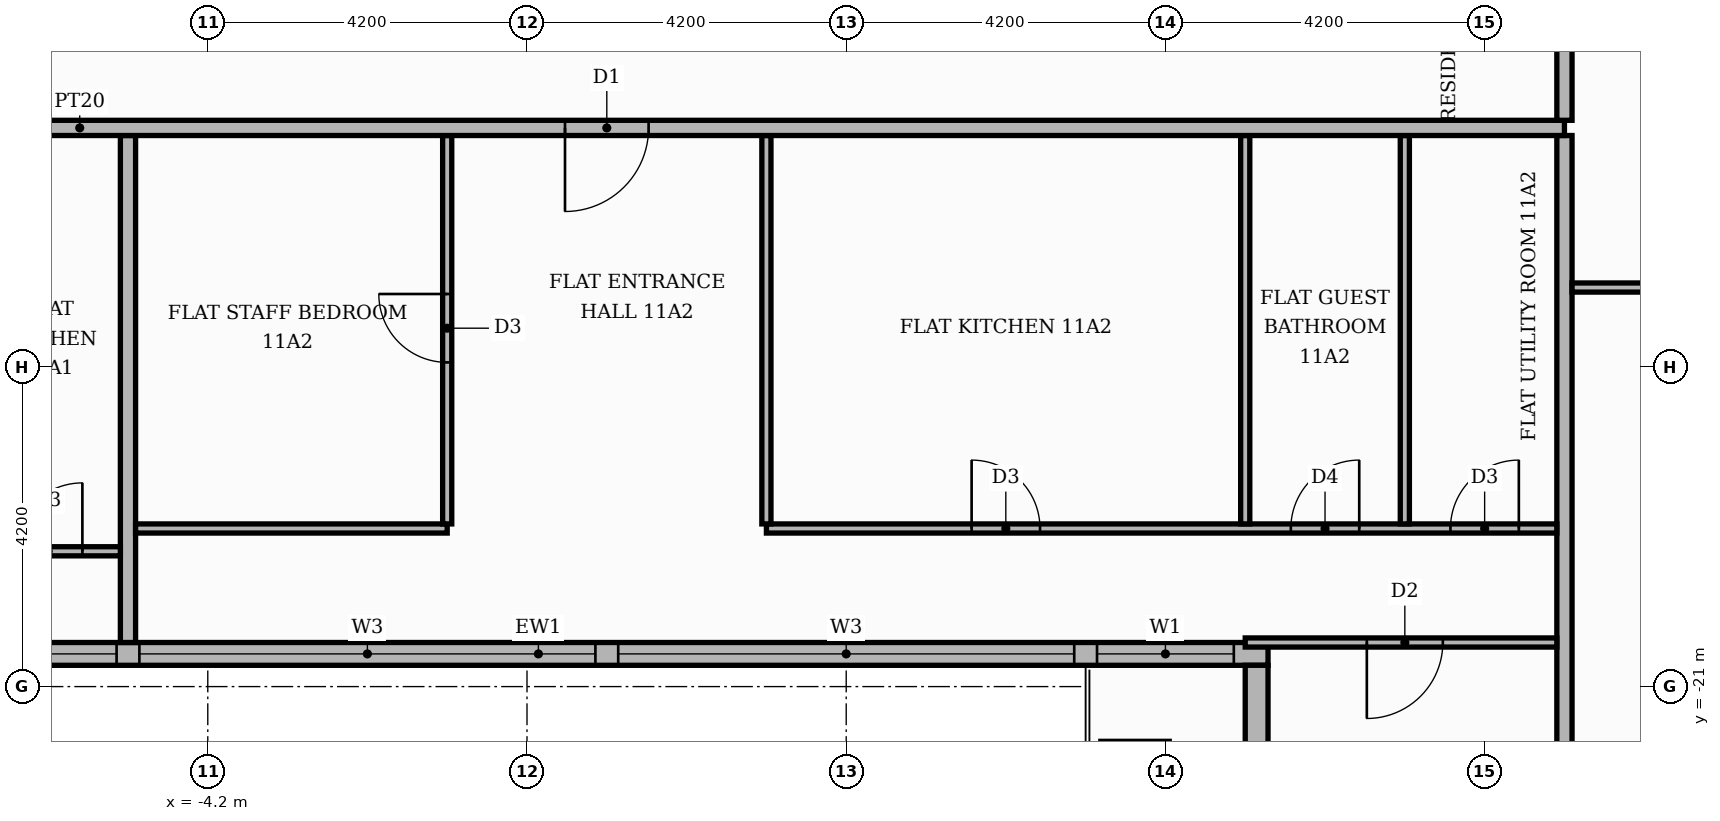
"""IFC4 building model, lengths in metres.
Left out: names, types, materials, properties, quantities, classifications, styles, units other than length and angle.
Written with IfcOpenShell. Run it as: python <this file> out.ifc"""

import sys

from ifc_helpers import new_model, si_unit, direction, frame, frame_2d, origin, place, context, subcontext, project, spatial, rectangle, extrude, element, fill, save


model = new_model("IFC4")
c1 = context("Model", 3, precision=1e-05, world=origin(), true_north=direction((0.0, 1.0)))
c2 = subcontext(c1, "Body", "Model", "MODEL_VIEW")
j1 = project(units=[si_unit("LENGTHUNIT", "METRE"), si_unit("PLANEANGLEUNIT", "RADIAN")], contexts=[c1])
p1 = place(None, origin())
s1 = spatial("IfcSite", under=j1, at=p1, CompositionType="ELEMENT")
p2 = place(p1, origin())
s2 = spatial("IfcBuilding", under=s1, at=p2, CompositionType="ELEMENT")
p3 = place(p2, frame((0.0, 0.0, 50.4)))
s3 = spatial("IfcBuildingStorey", under=s2, at=p3, CompositionType="ELEMENT", Elevation=50.4)
p4 = place(p3, frame((-9.45, -20.57, 0.0), z_axis=(0.0, 0.0, 1.0), x_axis=(1.0, 0.0, 0.0)))
e1 = element("IfcWall", 1, at=p4, inside=s3, PredefinedType="STANDARD", context=c2, shape_type="SweptSolid", body=[
    extrude(rectangle(XDim=19.2, YDim=0.3, at=frame_2d((9.6, 0.0))), origin(), (0.0, 0.0, 1.0), 3.48),
])
p5 = place(p4, frame((0.15, 0.0, 0.9)))
e2 = element("IfcOpeningElement", 2, at=p5, cuts=e1, PredefinedType="OPENING", context=c2, shape_type="SweptSolid", body=[
    extrude(rectangle(XDim=3.9, YDim=2.1, at=frame_2d((1.95, 1.05))), frame((0.0, 0.16, 0.0), z_axis=(0.0, -1.0, 0.0), x_axis=(1.0, 0.0, 0.0)), (0.0, 0.0, 1.0), 0.32),
])
p6 = place(p4, frame((4.35, 0.0, 0.9)))
e3 = element("IfcOpeningElement", 3, at=p6, cuts=e1, PredefinedType="OPENING", context=c2, shape_type="SweptSolid", body=[
    extrude(rectangle(XDim=6.0, YDim=2.1, at=frame_2d((3.0, 1.05))), frame((0.0, 0.16, 0.0), z_axis=(0.0, -1.0, 0.0), x_axis=(1.0, 0.0, 0.0)), (0.0, 0.0, 1.0), 0.32),
])
p7 = place(p4, frame((10.65, 0.0, 0.9)))
e4 = element("IfcOpeningElement", 4, at=p7, cuts=e1, PredefinedType="OPENING", context=c2, shape_type="SweptSolid", body=[
    extrude(rectangle(XDim=6.0, YDim=2.1, at=frame_2d((3.0, 1.05))), frame((0.0, 0.16, 0.0), z_axis=(0.0, -1.0, 0.0), x_axis=(1.0, 0.0, 0.0)), (0.0, 0.0, 1.0), 0.32),
])
p8 = place(p4, frame((16.95, 0.0, 0.9)))
e5 = element("IfcOpeningElement", 5, at=p8, cuts=e1, PredefinedType="OPENING", context=c2, shape_type="SweptSolid", body=[
    extrude(rectangle(XDim=1.8, YDim=2.1, at=frame_2d((0.9, 1.05))), frame((0.0, 0.16, 0.0), z_axis=(0.0, -1.0, 0.0), x_axis=(1.0, 0.0, 0.0)), (0.0, 0.0, 1.0), 0.32),
])
p9 = place(p3, frame((9.6, -20.72, 0.0), z_axis=(0.0, 0.0, 1.0), x_axis=(0.0, -1.0, 0.0)))
e6 = element("IfcWall", 6, at=p9, inside=s3, PredefinedType="STANDARD", context=c2, shape_type="SweptSolid", body=[
    extrude(rectangle(XDim=5.0, YDim=0.3, at=frame_2d((2.5, 0.0))), origin(), (0.0, 0.0, 1.0), 3.48),
])
p10 = place(p9, frame((1.48, 0.0, 0.0)))
e7 = element("IfcOpeningElement", 7, at=p10, cuts=e6, PredefinedType="OPENING", context=c2, shape_type="SweptSolid", body=[
    extrude(rectangle(XDim=1.8, YDim=2.4, at=frame_2d((0.9, 1.2))), frame((0.0, 0.16, 0.0), z_axis=(0.0, -1.0, 0.0), x_axis=(1.0, 0.0, 0.0)), (0.0, 0.0, 1.0), 0.32),
])
p11 = place(p3, frame((13.65, -25.42, 0.0), z_axis=(0.0, 0.0, 1.0), x_axis=(0.0, 1.0, 0.0)))
e8 = element("IfcWall", 8, at=p11, inside=s3, PredefinedType="PARTITIONING", context=c2, shape_type="SweptSolid", body=[
    extrude(rectangle(XDim=11.67, YDim=0.2, at=frame_2d((5.835, 0.0))), origin(), (0.0, 0.0, 1.0), 3.48),
])
p12 = place(p3, frame((-5.25, -20.42, 0.0), z_axis=(0.0, 0.0, 1.0), x_axis=(0.0, 1.0, 0.0)))
e9 = element("IfcWall", 9, at=p12, inside=s3, PredefinedType="PARTITIONING", context=c2, shape_type="SweptSolid", body=[
    extrude(rectangle(XDim=6.67, YDim=0.2, at=frame_2d((3.335, 0.0))), origin(), (0.0, 0.0, 1.0), 3.48),
])
p13 = place(p3, frame((9.45, -20.42, 0.0), z_axis=(0.0, 0.0, 1.0), x_axis=(1.0, 0.0, 0.0)))
e10 = element("IfcWall", 10, at=p13, inside=s3, PredefinedType="PARTITIONING", context=c2, shape_type="SweptSolid", body=[
    extrude(rectangle(XDim=4.1, YDim=0.12, at=frame_2d((2.05, 0.0))), origin(), (0.0, 0.0, 1.0), 3.48),
])
p14 = place(p13, frame((1.6, 0.0, 0.0)))
e11 = element("IfcOpeningElement", 11, at=p14, cuts=e10, PredefinedType="OPENING", context=c2, shape_type="SweptSolid", body=[
    extrude(rectangle(XDim=1.0, YDim=2.1, at=frame_2d((0.5, 1.05))), frame((0.0, 0.07, 0.0), z_axis=(0.0, -1.0, 0.0), x_axis=(1.0, 0.0, 0.0)), (0.0, 0.0, 1.0), 0.14),
])
p15 = place(p3, frame((-9.45, -19.22, 0.0), z_axis=(0.0, 0.0, 1.0), x_axis=(1.0, 0.0, 0.0)))
e12 = element("IfcWall", 12, at=p15, inside=s3, PredefinedType="PARTITIONING", context=c2, shape_type="SweptSolid", body=[
    extrude(rectangle(XDim=4.1, YDim=0.12, at=frame_2d((2.05, 0.0))), origin(), (0.0, 0.0, 1.0), 3.48),
])
p16 = place(p15, frame((2.7, 0.0, 0.0)))
e13 = element("IfcOpeningElement", 13, at=p16, cuts=e12, PredefinedType="OPENING", context=c2, shape_type="SweptSolid", body=[
    extrude(rectangle(XDim=0.9, YDim=2.1, at=frame_2d((0.45, 1.05))), frame((0.0, 0.07, 0.0), z_axis=(0.0, -1.0, 0.0), x_axis=(1.0, 0.0, 0.0)), (0.0, 0.0, 1.0), 0.14),
])
p17 = place(p3, frame((-5.15, -18.92, 0.0), z_axis=(0.0, 0.0, 1.0), x_axis=(1.0, 0.0, 0.0)))
e14 = element("IfcWall", 14, at=p17, inside=s3, PredefinedType="PARTITIONING", context=c2, shape_type="SweptSolid", body=[
    extrude(rectangle(XDim=4.1, YDim=0.12, at=frame_2d((2.05, 0.0))), origin(), (0.0, 0.0, 1.0), 3.48),
])
p18 = place(p3, frame((3.15, -18.92, 0.0), z_axis=(0.0, 0.0, 1.0), x_axis=(1.0, 0.0, 0.0)))
e15 = element("IfcWall", 15, at=p18, inside=s3, PredefinedType="PARTITIONING", context=c2, shape_type="SweptSolid", body=[
    extrude(rectangle(XDim=10.4, YDim=0.12, at=frame_2d((5.2, 0.0))), origin(), (0.0, 0.0, 1.0), 3.48),
])
p19 = place(p18, frame((2.7, 0.0, 0.0)))
e16 = element("IfcOpeningElement", 16, at=p19, cuts=e15, PredefinedType="OPENING", context=c2, shape_type="SweptSolid", body=[
    extrude(rectangle(XDim=0.9, YDim=2.1, at=frame_2d((0.45, 1.05))), frame((0.0, 0.07, 0.0), z_axis=(0.0, -1.0, 0.0), x_axis=(1.0, 0.0, 0.0)), (0.0, 0.0, 1.0), 0.14),
])
p20 = place(p18, frame((6.9, 0.0, 0.0)))
e17 = element("IfcOpeningElement", 17, at=p20, cuts=e15, PredefinedType="OPENING", context=c2, shape_type="SweptSolid", body=[
    extrude(rectangle(XDim=0.9, YDim=2.1, at=frame_2d((0.45, 1.05))), frame((0.0, 0.07, 0.0), z_axis=(0.0, -1.0, 0.0), x_axis=(1.0, 0.0, 0.0)), (0.0, 0.0, 1.0), 0.14),
])
p21 = place(p18, frame((9.0, 0.0, 0.0)))
e18 = element("IfcOpeningElement", 18, at=p21, cuts=e15, PredefinedType="OPENING", context=c2, shape_type="SweptSolid", body=[
    extrude(rectangle(XDim=0.9, YDim=2.1, at=frame_2d((0.45, 1.05))), frame((0.0, 0.07, 0.0), z_axis=(0.0, -1.0, 0.0), x_axis=(1.0, 0.0, 0.0)), (0.0, 0.0, 1.0), 0.14),
])
p22 = place(p3, frame((-1.05, -18.86, 0.0), z_axis=(0.0, 0.0, 1.0), x_axis=(0.0, 1.0, 0.0)))
e19 = element("IfcWall", 19, at=p22, inside=s3, PredefinedType="PARTITIONING", context=c2, shape_type="SweptSolid", body=[
    extrude(rectangle(XDim=5.11, YDim=0.12, at=frame_2d((2.555, 0.0))), origin(), (0.0, 0.0, 1.0), 3.48),
])
p23 = place(p22, frame((2.125, 0.0, 0.0)))
e20 = element("IfcOpeningElement", 20, at=p23, cuts=e19, PredefinedType="OPENING", context=c2, shape_type="SweptSolid", body=[
    extrude(rectangle(XDim=0.9, YDim=2.1, at=frame_2d((0.45, 1.05))), frame((0.0, 0.07, 0.0), z_axis=(0.0, -1.0, 0.0), x_axis=(1.0, 0.0, 0.0)), (0.0, 0.0, 1.0), 0.14),
])
for number, where, z_axis, x_axis in (
    (21, (3.15, -18.86, 0.0), (0.0, 0.0, 1.0), (0.0, 1.0, 0.0)),
    (22, (9.45, -18.86, 0.0), (0.0, 0.0, 1.0), (0.0, 1.0, 0.0)),
    (23, (11.55, -18.86, 0.0), (0.0, 0.0, 1.0), (0.0, 1.0, 0.0)),
):
    element("IfcWall", number, at=place(p3, frame(where, z_axis=z_axis, x_axis=x_axis)), inside=s3, PredefinedType="PARTITIONING", context=c2, shape_type="SweptSolid", body=[
        extrude(rectangle(XDim=5.11, YDim=0.12, at=frame_2d((2.555, 0.0))), origin(), (0.0, 0.0, 1.0), 3.48),
    ])
p24 = place(p3, frame((13.75, -15.75, 0.0), z_axis=(0.0, 0.0, 1.0), x_axis=(1.0, 0.0, 0.0)))
e24 = element("IfcWall", 24, at=p24, inside=s3, PredefinedType="PARTITIONING", context=c2, shape_type="SweptSolid", body=[
    extrude(rectangle(XDim=6.67, YDim=0.12, at=frame_2d((3.335, 0.0))), origin(), (0.0, 0.0, 1.0), 3.48),
])
p25 = place(p24, frame((2.785, 0.0, 0.0)))
e25 = element("IfcOpeningElement", 25, at=p25, cuts=e24, PredefinedType="OPENING", context=c2, shape_type="SweptSolid", body=[
    extrude(rectangle(XDim=1.0, YDim=2.1, at=frame_2d((0.5, 1.05))), frame((0.0, 0.07, 0.0), z_axis=(0.0, -1.0, 0.0), x_axis=(1.0, 0.0, 0.0)), (0.0, 0.0, 1.0), 0.14),
])
p26 = place(p3, frame((-25.42, -13.65, 0.0), z_axis=(0.0, 0.0, 1.0), x_axis=(1.0, 0.0, 0.0)))
e26 = element("IfcWall", 26, at=p26, inside=s3, PredefinedType="PARTITIONING", context=c2, shape_type="SweptSolid", body=[
    extrude(rectangle(XDim=39.07, YDim=0.2, at=frame_2d((19.535, 0.0))), origin(), (0.0, 0.0, 1.0), 3.48),
])
p27 = place(p26, frame((13.32, 0.0, 0.0)))
e27 = element("IfcOpeningElement", 27, at=p27, cuts=e26, PredefinedType="OPENING", context=c2, shape_type="SweptSolid", body=[
    extrude(rectangle(XDim=1.1, YDim=2.4, at=frame_2d((0.55, 1.2))), frame((0.0, 0.11, 0.0), z_axis=(0.0, -1.0, 0.0), x_axis=(1.0, 0.0, 0.0)), (0.0, 0.0, 1.0), 0.22),
])
p28 = place(p26, frame((25.92, 0.0, 0.0)))
e28 = element("IfcOpeningElement", 28, at=p28, cuts=e26, PredefinedType="OPENING", context=c2, shape_type="SweptSolid", body=[
    extrude(rectangle(XDim=1.1, YDim=2.4, at=frame_2d((0.55, 1.2))), frame((0.0, 0.11, 0.0), z_axis=(0.0, -1.0, 0.0), x_axis=(1.0, 0.0, 0.0)), (0.0, 0.0, 1.0), 0.22),
])
p29 = place(p3, frame((13.65, -13.55, 0.0), z_axis=(0.0, 0.0, 1.0), x_axis=(0.0, 1.0, 0.0)))
e29 = element("IfcWall", 29, at=p29, inside=s3, PredefinedType="PARTITIONING", context=c2, shape_type="SweptSolid", body=[
    extrude(rectangle(XDim=27.1, YDim=0.2, at=frame_2d((13.55, 0.0))), origin(), (0.0, 0.0, 1.0), 3.48),
])
p30 = place(p29, frame((1.45, 0.0, 0.0)))
e30 = element("IfcOpeningElement", 30, at=p30, cuts=e29, PredefinedType="OPENING", context=c2, shape_type="SweptSolid", body=[
    extrude(rectangle(XDim=1.1, YDim=2.4, at=frame_2d((0.55, 1.2))), frame((0.0, 0.11, 0.0), z_axis=(0.0, -1.0, 0.0), x_axis=(1.0, 0.0, 0.0)), (0.0, 0.0, 1.0), 0.22),
])
p31 = place(p5, origin())
e31 = element("IfcWindow", 31, at=p31, inside=s3, PartitioningType="SINGLE_PANEL", PredefinedType="WINDOW", context=c2, shape_type="SweptSolid", body=[
    extrude(rectangle(XDim=3.9, YDim=2.1, at=frame_2d((1.95, 1.05))), frame((0.0, 0.03, 0.0), z_axis=(0.0, -1.0, 0.0), x_axis=(1.0, 0.0, 0.0)), (0.0, 0.0, 1.0), 0.06),
])
fill(e2, e31)
p32 = place(p6, origin())
e32 = element("IfcWindow", 32, at=p32, inside=s3, PartitioningType="SINGLE_PANEL", PredefinedType="WINDOW", context=c2, shape_type="SweptSolid", body=[
    extrude(rectangle(XDim=6.0, YDim=2.1, at=frame_2d((3.0, 1.05))), frame((0.0, 0.03, 0.0), z_axis=(0.0, -1.0, 0.0), x_axis=(1.0, 0.0, 0.0)), (0.0, 0.0, 1.0), 0.06),
])
fill(e3, e32)
p33 = place(p7, origin())
e33 = element("IfcWindow", 33, at=p33, inside=s3, PartitioningType="SINGLE_PANEL", PredefinedType="WINDOW", context=c2, shape_type="SweptSolid", body=[
    extrude(rectangle(XDim=6.0, YDim=2.1, at=frame_2d((3.0, 1.05))), frame((0.0, 0.03, 0.0), z_axis=(0.0, -1.0, 0.0), x_axis=(1.0, 0.0, 0.0)), (0.0, 0.0, 1.0), 0.06),
])
fill(e4, e33)
p34 = place(p8, origin())
e34 = element("IfcWindow", 34, at=p34, inside=s3, PartitioningType="SINGLE_PANEL", PredefinedType="WINDOW", context=c2, shape_type="SweptSolid", body=[
    extrude(rectangle(XDim=1.8, YDim=2.1, at=frame_2d((0.9, 1.05))), frame((0.0, 0.03, 0.0), z_axis=(0.0, -1.0, 0.0), x_axis=(1.0, 0.0, 0.0)), (0.0, 0.0, 1.0), 0.06),
])
fill(e5, e34)
p35 = place(p16, origin())
e35 = element("IfcDoor", 35, at=p35, inside=s3, OperationType="SINGLE_SWING_RIGHT", PredefinedType="DOOR", context=c2, shape_type="SweptSolid", body=[
    extrude(rectangle(XDim=0.9, YDim=2.1, at=frame_2d((0.45, 1.05))), frame((0.0, 0.025, 0.0), z_axis=(0.0, -1.0, 0.0), x_axis=(1.0, 0.0, 0.0)), (0.0, 0.0, 1.0), 0.05),
])
fill(e13, e35)
p36 = place(p28, frame((1.1, 0.0, 0.0), z_axis=(0.0, 0.0, 1.0), x_axis=(-1.0, 0.0, 0.0)))
e36 = element("IfcDoor", 36, at=p36, inside=s3, OperationType="SINGLE_SWING_LEFT", PredefinedType="DOOR", context=c2, shape_type="SweptSolid", body=[
    extrude(rectangle(XDim=1.1, YDim=2.4, at=frame_2d((0.55, 1.2))), frame((0.0, 0.025, 0.0), z_axis=(0.0, -1.0, 0.0), x_axis=(1.0, 0.0, 0.0)), (0.0, 0.0, 1.0), 0.05),
])
fill(e28, e36)
p37 = place(p23, origin())
e37 = element("IfcDoor", 37, at=p37, inside=s3, OperationType="SINGLE_SWING_RIGHT", PredefinedType="DOOR", context=c2, shape_type="SweptSolid", body=[
    extrude(rectangle(XDim=0.9, YDim=2.1, at=frame_2d((0.45, 1.05))), frame((0.0, 0.025, 0.0), z_axis=(0.0, -1.0, 0.0), x_axis=(1.0, 0.0, 0.0)), (0.0, 0.0, 1.0), 0.05),
])
fill(e20, e37)
p38 = place(p19, origin())
e38 = element("IfcDoor", 38, at=p38, inside=s3, OperationType="SINGLE_SWING_LEFT", PredefinedType="DOOR", context=c2, shape_type="SweptSolid", body=[
    extrude(rectangle(XDim=0.9, YDim=2.1, at=frame_2d((0.45, 1.05))), frame((0.0, 0.025, 0.0), z_axis=(0.0, -1.0, 0.0), x_axis=(1.0, 0.0, 0.0)), (0.0, 0.0, 1.0), 0.05),
])
fill(e16, e38)
p39 = place(p20, origin())
e39 = element("IfcDoor", 39, at=p39, inside=s3, OperationType="SINGLE_SWING_RIGHT", PredefinedType="DOOR", context=c2, shape_type="SweptSolid", body=[
    extrude(rectangle(XDim=0.9, YDim=2.1, at=frame_2d((0.45, 1.05))), frame((0.0, 0.025, 0.0), z_axis=(0.0, -1.0, 0.0), x_axis=(1.0, 0.0, 0.0)), (0.0, 0.0, 1.0), 0.05),
])
fill(e17, e39)
p40 = place(p21, origin())
e40 = element("IfcDoor", 40, at=p40, inside=s3, OperationType="SINGLE_SWING_RIGHT", PredefinedType="DOOR", context=c2, shape_type="SweptSolid", body=[
    extrude(rectangle(XDim=0.9, YDim=2.1, at=frame_2d((0.45, 1.05))), frame((0.0, 0.025, 0.0), z_axis=(0.0, -1.0, 0.0), x_axis=(1.0, 0.0, 0.0)), (0.0, 0.0, 1.0), 0.05),
])
fill(e18, e40)
p41 = place(p14, frame((1.0, 0.0, 0.0), z_axis=(0.0, 0.0, 1.0), x_axis=(-1.0, 0.0, 0.0)))
e41 = element("IfcDoor", 41, at=p41, inside=s3, OperationType="SINGLE_SWING_LEFT", PredefinedType="DOOR", context=c2, shape_type="SweptSolid", body=[
    extrude(rectangle(XDim=1.0, YDim=2.1, at=frame_2d((0.5, 1.05))), frame((0.0, 0.025, 0.0), z_axis=(0.0, -1.0, 0.0), x_axis=(1.0, 0.0, 0.0)), (0.0, 0.0, 1.0), 0.05),
])
fill(e11, e41)
save(model, sys.argv[1])
